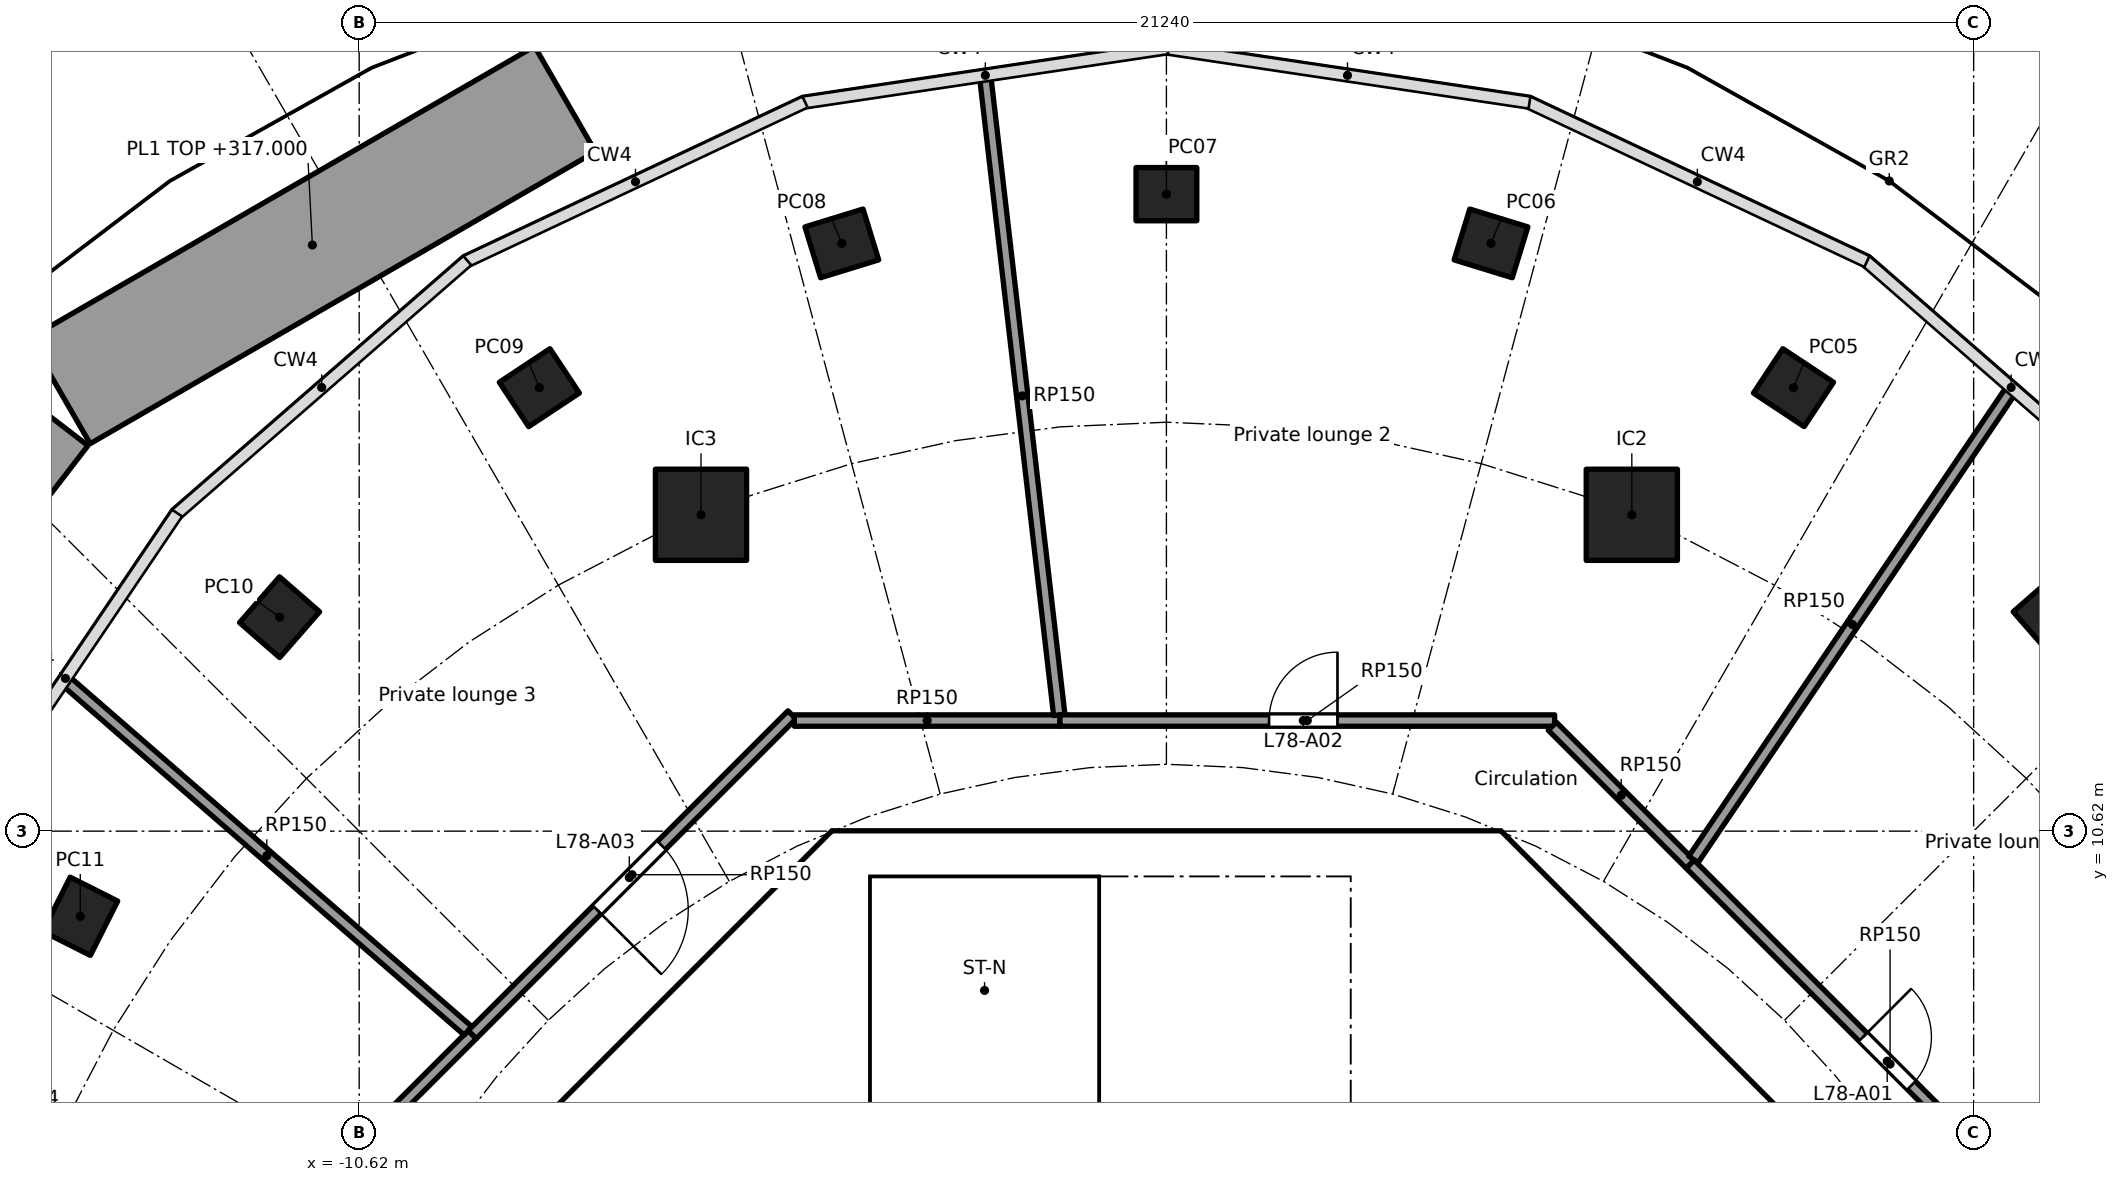
"""IFC4 building model, lengths in metres.
Left out: names, types, materials, properties, quantities, classifications, styles, units other than length and angle.
Written with IfcOpenShell. Run it as: python <this file> out.ifc"""

import sys

from ifc_helpers import new_model, si_unit, direction, frame, frame_2d, origin, origin_2d, place, context, subcontext, project, spatial, polyline, rectangle, hollow_rectangle, outline, extrude, element, fill, save


model = new_model("IFC4")
c1 = context("Model", 3, precision=1e-05, world=origin(), true_north=direction((0.0, 1.0)))
c2 = subcontext(c1, "Body", "Model", "MODEL_VIEW")
j1 = project(units=[si_unit("LENGTHUNIT", "METRE"), si_unit("PLANEANGLEUNIT", "RADIAN")], contexts=[c1])
p1 = place(None, origin())
s1 = spatial("IfcSite", under=j1, at=p1, CompositionType="ELEMENT")
p2 = place(p1, origin())
s2 = spatial("IfcBuilding", under=s1, at=p2, CompositionType="ELEMENT")
p3 = place(p2, frame((0.0, 0.0, 315.9)))
s3 = spatial("IfcBuildingStorey", under=s2, at=p3, CompositionType="ELEMENT", Elevation=315.9)
for number, where, z_axis, x_axis in (
    (1, (11.667, 13.435, -0.3), (0.0, 0.0, 1.0), (-0.657, 0.754, 0.0)),
    (2, (8.25, 16.455, -0.3), (0.0, 0.0, 1.0), (-0.834, 0.552, 0.0)),
    (3, (4.271, 18.353, -0.3), (0.0, 0.0, 1.0), (-0.956, 0.294, 0.0)),
    (4, (0.0, 19.0, -0.3), (0.0, 0.0, 1.0), (-1.0, 0.0, 0.0)),
    (5, (-4.271, 18.353, -0.3), (0.0, 0.0, 1.0), (-0.956, -0.294, 0.0)),
    (6, (-8.25, 16.455, -0.3), (0.0, 0.0, 1.0), (-0.834, -0.552, 0.0)),
    (7, (-11.667, 13.435, -0.3), (0.0, 0.0, 1.0), (-0.657, -0.754, 0.0)),
    (8, (-14.289, 9.5, -0.3), (0.0, 0.0, 1.0), (-0.45, -0.893, 0.0)),
):
    element("IfcColumn", number, at=place(p3, frame(where, z_axis=z_axis, x_axis=x_axis)), inside=s3, PredefinedType="COLUMN", context=c2, shape_type="SweptSolid", body=[
        extrude(hollow_rectangle(XDim=0.8, YDim=0.7, WallThickness=0.025, at=origin_2d()), origin(), (0.0, 0.0, 1.0), 4.8),
    ])
for number, where, z_axis, x_axis in (
    (9, (6.123, 14.782, 0.0), (0.0, 0.0, 1.0), (1.0, 0.0, 0.0)),
    (10, (-6.123, 14.782, 0.0), (0.0, 0.0, 1.0), (1.0, 0.0, 0.0)),
):
    element("IfcColumn", number, at=place(p3, frame(where, z_axis=z_axis, x_axis=x_axis)), inside=s3, PredefinedType="COLUMN", context=c2, shape_type="SweptSolid", body=[
        extrude(rectangle(XDim=1.2, YDim=1.2, at=origin_2d()), origin(), (0.0, 0.0, 1.0), 4.5),
    ])
p4 = place(p3, frame((-20.125, 9.296, 0.0), z_axis=(0.0, 0.0, 1.0), x_axis=(0.61024421244, 0.792213355848, 0.0)))
e11 = element("IfcWall", 11, at=p4, inside=s3, PredefinedType="SOLIDWALL", context=c2, shape_type="SweptSolid", body=[
    extrude(rectangle(XDim=8.69, YDim=1.6, at=frame_2d((4.345, 0.0))), origin(), (0.0, 0.0, 1.0), 1.1),
])
p5 = place(p3, frame((-14.56, 16.41, 0.0), z_axis=(0.0, 0.0, 1.0), x_axis=(0.86581211196, 0.500369250438, 0.0)))
e12 = element("IfcWall", 12, at=p5, inside=s3, PredefinedType="SOLIDWALL", context=c2, shape_type="SweptSolid", body=[
    extrude(rectangle(XDim=7.677, YDim=1.6, at=frame_2d((3.839, 0.0))), origin(), (0.0, 0.0, 1.0), 1.1),
])
p6 = place(p3, frame((9.988, 4.613, 0.0), z_axis=(0.0, 0.0, 1.0), x_axis=(-0.707106781187, 0.707106781187, 0.0)))
e13 = element("IfcWall", 13, at=p6, inside=s3, PredefinedType="SHEAR", context=c2, shape_type="SweptSolid", body=[
    extrude(rectangle(XDim=7.602, YDim=0.6, at=frame_2d((3.801, 0.0))), origin(), (0.0, 0.0, 1.0), 4.2),
])
p7 = place(p6, frame((3.201, 0.0, 0.0)))
e14 = element("IfcOpeningElement", 14, at=p7, cuts=e13, PredefinedType="OPENING", context=c2, shape_type="SweptSolid", body=[
    extrude(rectangle(XDim=1.2, YDim=2.1, at=frame_2d((0.6, 1.05))), frame((0.0, 0.31, 0.0), z_axis=(0.0, -1.0, 0.0), x_axis=(1.0, 0.0, 0.0)), (0.0, 0.0, 1.0), 0.62),
])
p8 = place(p3, frame((-4.613, 9.988, 0.0), z_axis=(0.0, 0.0, 1.0), x_axis=(-0.707106781187, -0.707106781187, 0.0)))
e15 = element("IfcWall", 15, at=p8, inside=s3, PredefinedType="SHEAR", context=c2, shape_type="SweptSolid", body=[
    extrude(rectangle(XDim=7.602, YDim=0.6, at=frame_2d((3.801, 0.0))), origin(), (0.0, 0.0, 1.0), 4.2),
])
p9 = place(p8, frame((0.351, 0.0, 0.0)))
e16 = element("IfcOpeningElement", 16, at=p9, cuts=e15, PredefinedType="OPENING", context=c2, shape_type="SweptSolid", body=[
    extrude(rectangle(XDim=1.1, YDim=2.1, at=frame_2d((0.55, 1.05))), frame((0.0, 0.31, 0.0), z_axis=(0.0, -1.0, 0.0), x_axis=(1.0, 0.0, 0.0)), (0.0, 0.0, 1.0), 0.62),
])
p10 = place(p3, frame((4.0, 7.025, 0.0), z_axis=(0.0, 0.0, 1.0), x_axis=(0.0, 1.0, 0.0)))
e17 = element("IfcWall", 17, at=p10, inside=s3, PredefinedType="SOLIDWALL", context=c2, shape_type="SweptSolid", body=[
    extrude(rectangle(XDim=3.0, YDim=0.2, at=frame_2d((1.5, 0.0))), origin(), (0.0, 0.0, 1.0), 4.2),
])
p11 = place(p10, frame((0.925, 0.0, 0.0)))
e18 = element("IfcOpeningElement", 18, at=p11, cuts=e17, PredefinedType="OPENING", context=c2, shape_type="SweptSolid", body=[
    extrude(rectangle(XDim=1.1, YDim=2.1, at=frame_2d((0.55, 1.05))), frame((0.0, 0.11, 0.0), z_axis=(0.0, -1.0, 0.0), x_axis=(1.0, 0.0, 0.0)), (0.0, 0.0, 1.0), 0.22),
])
p12 = place(p3, origin())
e19 = element("IfcWall", 19, at=p12, inside=s3, PredefinedType="SHEAR", context=c2, shape_type="SweptSolid", body=[
    extrude(outline(polyline([(-4.152, 10.025), (-4.401, 9.776), (-4.825, 10.2), (-4.401, 10.625), (4.401, 10.625), (4.825, 10.2), (4.401, 9.776), (4.152, 10.025), (-4.152, 10.025)])), origin(), (0.0, 0.0, 1.0), 4.2),
])
p13 = place(p3, origin())
e20 = element("IfcWall", 20, at=p13, inside=s3, PredefinedType="SOLIDWALL", context=c2, shape_type="SweptSolid", body=[
    extrude(outline(polyline([(-3.9, 7.025), (-4.1, 7.025), (-4.1, 10.025), (-3.9, 10.025), (-3.9, 7.025)])), origin(), (0.0, 0.0, 1.0), 4.2),
])
p14 = place(p3, frame((-12.0, 5.077, 0.0), z_axis=(0.0, 0.0, 1.0), x_axis=(0.707197078955, 0.707016471886, 0.0)))
e21 = element("IfcWall", 21, at=p14, inside=s3, PredefinedType="PARTITIONING", context=c2, shape_type="SweptSolid", body=[
    extrude(rectangle(XDim=4.055, YDim=0.15, at=frame_2d((2.028, 0.0))), origin(), (0.0, 0.0, 1.0), 4.2),
])
p15 = place(p3, frame((-9.189, 7.993, 0.0), z_axis=(0.0, 0.0, 1.0), x_axis=(-0.754481157007, 0.656321707489, 0.0)))
e22 = element("IfcWall", 22, at=p15, inside=s3, PredefinedType="PARTITIONING", context=c2, shape_type="SweptSolid", body=[
    extrude(rectangle(XDim=7.016, YDim=0.15, at=frame_2d((3.508, 0.0))), origin(), (0.0, 0.0, 1.0), 4.2),
])
p16 = place(p3, frame((-9.132, 7.944, 0.0), z_axis=(0.0, 0.0, 1.0), x_axis=(0.707127303506, 0.707086258271, 0.0)))
e23 = element("IfcWall", 23, at=p16, inside=s3, PredefinedType="PARTITIONING", context=c2, shape_type="SweptSolid", body=[
    extrude(rectangle(XDim=5.948, YDim=0.15, at=frame_2d((2.974, 0.0))), origin(), (0.0, 0.0, 1.0), 4.2),
])
p17 = place(p16, frame((2.321, 0.0, 0.0)))
e24 = element("IfcOpeningElement", 24, at=p17, cuts=e23, PredefinedType="OPENING", context=c2, shape_type="SweptSolid", body=[
    extrude(rectangle(XDim=1.2, YDim=2.1, at=frame_2d((0.6, 1.05))), frame((0.0, 0.085, 0.0), z_axis=(0.0, -1.0, 0.0), x_axis=(1.0, 0.0, 0.0)), (0.0, 0.0, 1.0), 0.17),
])
p18 = place(p3, frame((-4.895, 12.075, 0.0), z_axis=(0.0, 0.0, 1.0), x_axis=(1.0, 0.0, 0.0)))
e25 = element("IfcWall", 25, at=p18, inside=s3, PredefinedType="PARTITIONING", context=c2, shape_type="SweptSolid", body=[
    extrude(rectangle(XDim=3.494, YDim=0.15, at=frame_2d((1.747, 0.0))), origin(), (0.0, 0.0, 1.0), 4.2),
])
p19 = place(p3, frame((-1.41, 12.15, 0.0), z_axis=(0.0, 0.0, 1.0), x_axis=(-0.115263493726, 0.993334952075, 0.0)))
e26 = element("IfcWall", 26, at=p19, inside=s3, PredefinedType="PARTITIONING", context=c2, shape_type="SweptSolid", body=[
    extrude(rectangle(XDim=8.449, YDim=0.15, at=frame_2d((4.225, 0.0))), origin(), (0.0, 0.0, 1.0), 4.2),
])
p20 = place(p3, frame((-1.401, 12.075, 0.0), z_axis=(0.0, 0.0, 1.0), x_axis=(1.0, 0.0, 0.0)))
e27 = element("IfcWall", 27, at=p20, inside=s3, PredefinedType="PARTITIONING", context=c2, shape_type="SweptSolid", body=[
    extrude(rectangle(XDim=6.509, YDim=0.15, at=frame_2d((3.254, 0.0))), origin(), (0.0, 0.0, 1.0), 4.2),
])
p21 = place(p20, frame((2.751, 0.0, 0.0)))
e28 = element("IfcOpeningElement", 28, at=p21, cuts=e27, PredefinedType="OPENING", context=c2, shape_type="SweptSolid", body=[
    extrude(rectangle(XDim=0.9, YDim=2.1, at=frame_2d((0.45, 1.05))), frame((0.0, 0.085, 0.0), z_axis=(0.0, -1.0, 0.0), x_axis=(1.0, 0.0, 0.0)), (0.0, 0.0, 1.0), 0.17),
])
p22 = place(p3, frame((5.077, 12.0, 0.0), z_axis=(0.0, 0.0, 1.0), x_axis=(0.706964061082, -0.707249472491, 0.0)))
e29 = element("IfcWall", 29, at=p22, inside=s3, PredefinedType="PARTITIONING", context=c2, shape_type="SweptSolid", body=[
    extrude(rectangle(XDim=2.566, YDim=0.15, at=frame_2d((1.283, 0.0))), origin(), (0.0, 0.0, 1.0), 4.2),
])
p23 = place(p3, frame((6.934, 10.248, 0.0), z_axis=(0.0, 0.0, 1.0), x_axis=(0.56046251301, 0.828179794194, 0.0)))
e30 = element("IfcWall", 30, at=p23, inside=s3, PredefinedType="PARTITIONING", context=c2, shape_type="SweptSolid", body=[
    extrude(rectangle(XDim=7.462, YDim=0.15, at=frame_2d((3.731, 0.0))), origin(), (0.0, 0.0, 1.0), 4.2),
])
p24 = place(p3, frame((6.891, 10.185, 0.0), z_axis=(0.0, 0.0, 1.0), x_axis=(0.70715602432, -0.707057534623, 0.0)))
e31 = element("IfcWall", 31, at=p24, inside=s3, PredefinedType="PARTITIONING", context=c2, shape_type="SweptSolid", body=[
    extrude(rectangle(XDim=7.437, YDim=0.15, at=frame_2d((3.718, 0.0))), origin(), (0.0, 0.0, 1.0), 4.2),
])
p25 = place(p24, frame((3.215, 0.0, 0.0)))
e32 = element("IfcOpeningElement", 32, at=p25, cuts=e31, PredefinedType="OPENING", context=c2, shape_type="SweptSolid", body=[
    extrude(rectangle(XDim=0.9, YDim=2.1, at=frame_2d((0.45, 1.05))), frame((0.0, 0.085, 0.0), z_axis=(0.0, -1.0, 0.0), x_axis=(1.0, 0.0, 0.0)), (0.0, 0.0, 1.0), 0.17),
])
p26 = place(p11, origin())
e33 = element("IfcDoor", 33, at=p26, inside=s3, OperationType="SINGLE_SWING_RIGHT", PredefinedType="DOOR", context=c2, shape_type="SweptSolid", body=[
    extrude(rectangle(XDim=1.1, YDim=2.1, at=frame_2d((0.55, 1.05))), frame((0.0, 0.025, 0.0), z_axis=(0.0, -1.0, 0.0), x_axis=(1.0, 0.0, 0.0)), (0.0, 0.0, 1.0), 0.05),
])
fill(e18, e33)
p27 = place(p7, origin())
e34 = element("IfcDoor", 34, at=p27, inside=s3, OperationType="SINGLE_SWING_LEFT", PredefinedType="DOOR", context=c2, shape_type="SweptSolid", body=[
    extrude(rectangle(XDim=1.2, YDim=2.1, at=frame_2d((0.6, 1.05))), frame((0.0, 0.025, 0.0), z_axis=(0.0, -1.0, 0.0), x_axis=(1.0, 0.0, 0.0)), (0.0, 0.0, 1.0), 0.05),
])
fill(e14, e34)
p28 = place(p9, origin())
e35 = element("IfcDoor", 35, at=p28, inside=s3, OperationType="SINGLE_SWING_LEFT", PredefinedType="DOOR", context=c2, shape_type="SweptSolid", body=[
    extrude(rectangle(XDim=1.1, YDim=2.1, at=frame_2d((0.55, 1.05))), frame((0.0, 0.025, 0.0), z_axis=(0.0, -1.0, 0.0), x_axis=(1.0, 0.0, 0.0)), (0.0, 0.0, 1.0), 0.05),
])
fill(e16, e35)
p29 = place(p25, origin())
e36 = element("IfcDoor", 36, at=p29, inside=s3, OperationType="SINGLE_SWING_LEFT", PredefinedType="DOOR", context=c2, shape_type="SweptSolid", body=[
    extrude(rectangle(XDim=0.9, YDim=2.1, at=frame_2d((0.45, 1.05))), frame((0.0, 0.025, 0.0), z_axis=(0.0, -1.0, 0.0), x_axis=(1.0, 0.0, 0.0)), (0.0, 0.0, 1.0), 0.05),
])
fill(e32, e36)
p30 = place(p21, origin())
e37 = element("IfcDoor", 37, at=p30, inside=s3, OperationType="SINGLE_SWING_RIGHT", PredefinedType="DOOR", context=c2, shape_type="SweptSolid", body=[
    extrude(rectangle(XDim=0.9, YDim=2.1, at=frame_2d((0.45, 1.05))), frame((0.0, 0.025, 0.0), z_axis=(0.0, -1.0, 0.0), x_axis=(1.0, 0.0, 0.0)), (0.0, 0.0, 1.0), 0.05),
])
fill(e28, e37)
p31 = place(p17, frame((1.2, 0.0, 0.0), x_axis=(-1.0, 0.0, 0.0)))
e38 = element("IfcDoor", 38, at=p31, inside=s3, OperationType="SINGLE_SWING_RIGHT", PredefinedType="DOOR", context=c2, shape_type="SweptSolid", body=[
    extrude(rectangle(XDim=1.2, YDim=2.1, at=frame_2d((0.6, 1.05))), frame((0.0, 0.025, 0.0), z_axis=(0.0, -1.0, 0.0), x_axis=(1.0, 0.0, 0.0)), (0.0, 0.0, 1.0), 0.05),
])
fill(e24, e38)
save(model, sys.argv[1])
